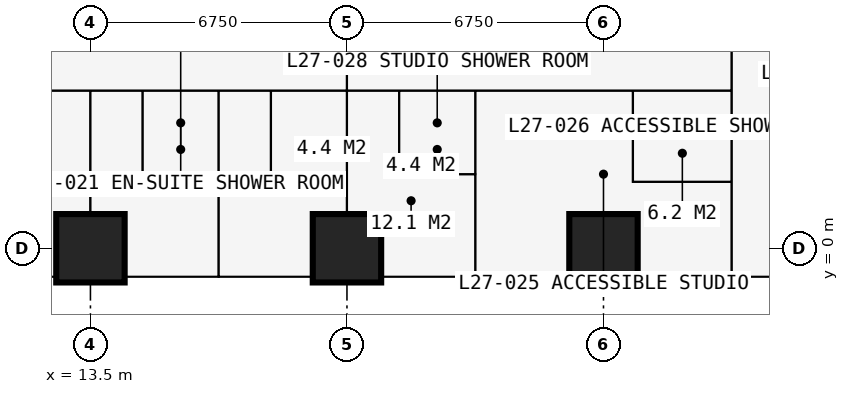
"""IFC4 building model, lengths in metres.
Left out: names, types, materials, properties, quantities, classifications, styles, units other than length and angle.
Written with IfcOpenShell. Run it as: python <this file> out.ifc"""

import sys

from ifc_helpers import new_model, si_unit, direction, frame, frame_2d, origin, origin_2d, place, context, subcontext, project, spatial, rectangle, extrude, element, fill, save


model = new_model("IFC4")
c1 = context("Model", 3, precision=1e-05, world=origin(), true_north=direction((0.0, 1.0)))
c2 = subcontext(c1, "Body", "Model", "MODEL_VIEW")
j1 = project(units=[si_unit("LENGTHUNIT", "METRE"), si_unit("PLANEANGLEUNIT", "RADIAN")], contexts=[c1])
p1 = place(None, origin())
s1 = spatial("IfcSite", under=j1, at=p1, CompositionType="ELEMENT")
p2 = place(p1, origin())
s2 = spatial("IfcBuilding", under=s1, at=p2, CompositionType="ELEMENT")
p3 = place(p2, frame((0.0, 0.0, 101.7)))
s3 = spatial("IfcBuildingStorey", under=s2, at=p3, CompositionType="ELEMENT", Elevation=101.7)
for number, where, z_axis, x_axis in (
    (1, (13.5, 0.0, 0.0), (0.0, 0.0, 1.0), (1.0, 0.0, 0.0)),
    (2, (20.25, 0.0, 0.0), (0.0, 0.0, 1.0), (1.0, 0.0, 0.0)),
    (3, (27.0, 0.0, 0.0), (0.0, 0.0, 1.0), (1.0, 0.0, 0.0)),
):
    element("IfcColumn", number, at=place(p3, frame(where, z_axis=z_axis, x_axis=x_axis)), inside=s3, PredefinedType="COLUMN", context=c2, shape_type="SweptSolid", body=[
        extrude(rectangle(XDim=1.8, YDim=1.8, at=origin_2d()), origin(), (0.0, 0.0, 1.0), 3.6),
    ])
p4 = place(p3, frame((20.25, -0.75, 0.0), z_axis=(0.0, 0.0, 1.0), x_axis=(-1.0, 0.0, 0.0)))
e4 = element("IfcWall", 4, at=p4, inside=s3, PredefinedType="SOLIDWALL", context=c2, shape_type="SweptSolid", body=[
    extrude(rectangle(XDim=6.75, YDim=0.15, at=frame_2d((3.375, 0.0))), origin(), (0.0, 0.0, 1.0), 3.375),
])
p5 = place(p4, frame((0.962, 0.0, 0.0)))
e5 = element("IfcOpeningElement", 5, at=p5, cuts=e4, PredefinedType="OPENING", context=c2, shape_type="SweptSolid", body=[
    extrude(rectangle(XDim=1.0, YDim=2.2, at=frame_2d((0.5, 1.1))), frame((0.0, 0.085, 0.0), z_axis=(0.0, -1.0, 0.0), x_axis=(1.0, 0.0, 0.0)), (0.0, 0.0, 1.0), 0.17),
])
p6 = place(p4, frame((2.025, 0.0, 0.9)))
e6 = element("IfcOpeningElement", 6, at=p6, cuts=e4, PredefinedType="OPENING", context=c2, shape_type="SweptSolid", body=[
    extrude(rectangle(XDim=1.2, YDim=1.8, at=frame_2d((0.6, 0.9))), frame((0.0, 0.085, 0.0), z_axis=(0.0, -1.0, 0.0), x_axis=(1.0, 0.0, 0.0)), (0.0, 0.0, 1.0), 0.17),
])
p7 = place(p4, frame((4.788, 0.0, 0.0)))
e7 = element("IfcOpeningElement", 7, at=p7, cuts=e4, PredefinedType="OPENING", context=c2, shape_type="SweptSolid", body=[
    extrude(rectangle(XDim=1.0, YDim=2.2, at=frame_2d((0.5, 1.1))), frame((0.0, 0.085, 0.0), z_axis=(0.0, -1.0, 0.0), x_axis=(1.0, 0.0, 0.0)), (0.0, 0.0, 1.0), 0.17),
])
p8 = place(p4, frame((3.525, 0.0, 0.9)))
e8 = element("IfcOpeningElement", 8, at=p8, cuts=e4, PredefinedType="OPENING", context=c2, shape_type="SweptSolid", body=[
    extrude(rectangle(XDim=1.2, YDim=1.8, at=frame_2d((0.6, 0.9))), frame((0.0, 0.085, 0.0), z_axis=(0.0, -1.0, 0.0), x_axis=(1.0, 0.0, 0.0)), (0.0, 0.0, 1.0), 0.17),
])
p9 = place(p3, frame((16.875, -0.85, 0.0), z_axis=(0.0, 0.0, 1.0), x_axis=(0.0, -1.0, 0.0)))
e9 = element("IfcWall", 9, at=p9, inside=s3, PredefinedType="USERDEFINED", context=c2, shape_type="SweptSolid", body=[
    extrude(rectangle(XDim=2.2, YDim=1.0, at=frame_2d((1.1, 0.0))), origin(), (0.0, 0.0, 1.0), 0.9),
])
p10 = place(p3, frame((6.75, 4.15, 0.0), z_axis=(0.0, 0.0, 1.0), x_axis=(1.0, 0.0, 0.0)))
e10 = element("IfcWall", 10, at=p10, inside=s3, PredefinedType="PARTITIONING", context=c2, shape_type="SweptSolid", body=[
    extrude(rectangle(XDim=23.625, YDim=0.1, at=frame_2d((11.812, 0.0))), origin(), (0.0, 0.0, 1.0), 3.375),
])
p11 = place(p10, frame((2.85, 0.0, 0.0)))
e11 = element("IfcOpeningElement", 11, at=p11, cuts=e10, PredefinedType="OPENING", context=c2, shape_type="SweptSolid", body=[
    extrude(rectangle(XDim=1.0, YDim=2.2, at=frame_2d((0.5, 1.1))), frame((0.0, 0.06, 0.0), z_axis=(0.0, -1.0, 0.0), x_axis=(1.0, 0.0, 0.0)), (0.0, 0.0, 1.0), 0.12),
])
p12 = place(p10, frame((6.95, 0.0, 0.0)))
e12 = element("IfcOpeningElement", 12, at=p12, cuts=e10, PredefinedType="OPENING", context=c2, shape_type="SweptSolid", body=[
    extrude(rectangle(XDim=0.95, YDim=2.2, at=frame_2d((0.475, 1.1))), frame((0.0, 0.06, 0.0), z_axis=(0.0, -1.0, 0.0), x_axis=(1.0, 0.0, 0.0)), (0.0, 0.0, 1.0), 0.12),
])
p13 = place(p10, frame((10.375, 0.0, 0.0)))
e13 = element("IfcOpeningElement", 13, at=p13, cuts=e10, PredefinedType="OPENING", context=c2, shape_type="SweptSolid", body=[
    extrude(rectangle(XDim=0.95, YDim=2.2, at=frame_2d((0.475, 1.1))), frame((0.0, 0.06, 0.0), z_axis=(0.0, -1.0, 0.0), x_axis=(1.0, 0.0, 0.0)), (0.0, 0.0, 1.0), 0.12),
])
p14 = place(p10, frame((18.475, 0.0, 0.0)))
e14 = element("IfcOpeningElement", 14, at=p14, cuts=e10, PredefinedType="OPENING", context=c2, shape_type="SweptSolid", body=[
    extrude(rectangle(XDim=0.95, YDim=2.2, at=frame_2d((0.475, 1.1))), frame((0.0, 0.06, 0.0), z_axis=(0.0, -1.0, 0.0), x_axis=(1.0, 0.0, 0.0)), (0.0, 0.0, 1.0), 0.12),
])
p15 = place(p10, frame((13.7, 0.0, 0.0)))
e15 = element("IfcOpeningElement", 15, at=p15, cuts=e10, PredefinedType="OPENING", context=c2, shape_type="SweptSolid", body=[
    extrude(rectangle(XDim=0.95, YDim=2.2, at=frame_2d((0.475, 1.1))), frame((0.0, 0.06, 0.0), z_axis=(0.0, -1.0, 0.0), x_axis=(1.0, 0.0, 0.0)), (0.0, 0.0, 1.0), 0.12),
])
p16 = place(p3, frame((13.5, -0.734, 0.0), z_axis=(0.0, 0.0, 1.0), x_axis=(0.0, 1.0, 0.0)))
e16 = element("IfcWall", 16, at=p16, inside=s3, PredefinedType="PARTITIONING", context=c2, shape_type="SweptSolid", body=[
    extrude(rectangle(XDim=4.884, YDim=0.15, at=frame_2d((2.442, 0.0))), origin(), (0.0, 0.0, 1.0), 2.877),
])
p17 = place(p3, frame((14.875, 1.95, 0.0), z_axis=(0.0, 0.0, 1.0), x_axis=(0.0, 1.0, 0.0)))
e17 = element("IfcWall", 17, at=p17, inside=s3, PredefinedType="PARTITIONING", context=c2, shape_type="SweptSolid", body=[
    extrude(rectangle(XDim=2.2, YDim=0.1, at=frame_2d((1.1, 0.0))), origin(), (0.0, 0.0, 1.0), 3.375),
])
p18 = place(p17, frame((0.65, 0.0, 0.0)))
e18 = element("IfcOpeningElement", 18, at=p18, cuts=e17, PredefinedType="OPENING", context=c2, shape_type="SweptSolid", body=[
    extrude(rectangle(XDim=0.9, YDim=2.2, at=frame_2d((0.45, 1.1))), frame((0.0, 0.06, 0.0), z_axis=(0.0, -1.0, 0.0), x_axis=(1.0, 0.0, 0.0)), (0.0, 0.0, 1.0), 0.12),
])
p19 = place(p3, frame((14.875, 1.95, 0.0), z_axis=(0.0, 0.0, 1.0), x_axis=(1.0, 0.0, 0.0)))
e19 = element("IfcWall", 19, at=p19, inside=s3, PredefinedType="PARTITIONING", context=c2, shape_type="SweptSolid", body=[
    extrude(rectangle(XDim=2.0, YDim=0.1, at=frame_2d((1.0, 0.0))), origin(), (0.0, 0.0, 1.0), 3.375),
])
p20 = place(p3, frame((16.875, -0.734, 0.0), z_axis=(0.0, 0.0, 1.0), x_axis=(0.0, 1.0, 0.0)))
e20 = element("IfcWall", 20, at=p20, inside=s3, PredefinedType="PARTITIONING", context=c2, shape_type="SweptSolid", body=[
    extrude(rectangle(XDim=4.884, YDim=0.175, at=frame_2d((2.442, 0.0))), origin(), (0.0, 0.0, 1.0), 3.375),
])
p21 = place(p3, frame((18.25, 1.95, 0.0), z_axis=(0.0, 0.0, 1.0), x_axis=(0.0, 1.0, 0.0)))
e21 = element("IfcWall", 21, at=p21, inside=s3, PredefinedType="PARTITIONING", context=c2, shape_type="SweptSolid", body=[
    extrude(rectangle(XDim=2.2, YDim=0.1, at=frame_2d((1.1, 0.0))), origin(), (0.0, 0.0, 1.0), 3.375),
])
p22 = place(p21, frame((0.65, 0.0, 0.0)))
e22 = element("IfcOpeningElement", 22, at=p22, cuts=e21, PredefinedType="OPENING", context=c2, shape_type="SweptSolid", body=[
    extrude(rectangle(XDim=0.9, YDim=2.2, at=frame_2d((0.45, 1.1))), frame((0.0, 0.06, 0.0), z_axis=(0.0, -1.0, 0.0), x_axis=(1.0, 0.0, 0.0)), (0.0, 0.0, 1.0), 0.12),
])
p23 = place(p3, frame((18.25, 1.95, 0.0), z_axis=(0.0, 0.0, 1.0), x_axis=(1.0, 0.0, 0.0)))
e23 = element("IfcWall", 23, at=p23, inside=s3, PredefinedType="PARTITIONING", context=c2, shape_type="SweptSolid", body=[
    extrude(rectangle(XDim=2.0, YDim=0.1, at=frame_2d((1.0, 0.0))), origin(), (0.0, 0.0, 1.0), 3.375),
])
p24 = place(p3, frame((20.25, -0.734, 0.0), z_axis=(0.0, 0.0, 1.0), x_axis=(0.0, 1.0, 0.0)))
e24 = element("IfcWall", 24, at=p24, inside=s3, PredefinedType="PARTITIONING", context=c2, shape_type="SweptSolid", body=[
    extrude(rectangle(XDim=12.034, YDim=0.15, at=frame_2d((6.017, 0.0))), origin(), (0.0, 0.0, 1.0), 2.61),
])
p25 = place(p3, frame((21.625, 1.95, 0.0), z_axis=(0.0, 0.0, 1.0), x_axis=(0.0, 1.0, 0.0)))
e25 = element("IfcWall", 25, at=p25, inside=s3, PredefinedType="PARTITIONING", context=c2, shape_type="SweptSolid", body=[
    extrude(rectangle(XDim=2.2, YDim=0.1, at=frame_2d((1.1, 0.0))), origin(), (0.0, 0.0, 1.0), 3.375),
])
p26 = place(p3, frame((21.625, 1.95, 0.0), z_axis=(0.0, 0.0, 1.0), x_axis=(1.0, 0.0, 0.0)))
e26 = element("IfcWall", 26, at=p26, inside=s3, PredefinedType="PARTITIONING", context=c2, shape_type="SweptSolid", body=[
    extrude(rectangle(XDim=2.0, YDim=0.1, at=frame_2d((1.0, 0.0))), origin(), (0.0, 0.0, 1.0), 3.375),
])
p27 = place(p3, frame((23.625, -0.734, 0.0), z_axis=(0.0, 0.0, 1.0), x_axis=(0.0, 1.0, 0.0)))
e27 = element("IfcWall", 27, at=p27, inside=s3, PredefinedType="PARTITIONING", context=c2, shape_type="SweptSolid", body=[
    extrude(rectangle(XDim=4.884, YDim=0.175, at=frame_2d((2.442, 0.0))), origin(), (0.0, 0.0, 1.0), 3.375),
])
p28 = place(p27, frame((3.334, 0.0, 0.0)))
e28 = element("IfcOpeningElement", 28, at=p28, cuts=e27, PredefinedType="OPENING", context=c2, shape_type="SweptSolid", body=[
    extrude(rectangle(XDim=0.9, YDim=2.2, at=frame_2d((0.45, 1.1))), frame((0.0, 0.097, 0.0), z_axis=(0.0, -1.0, 0.0), x_axis=(1.0, 0.0, 0.0)), (0.0, 0.0, 1.0), 0.195),
])
p29 = place(p3, frame((27.775, 1.75, 0.0), z_axis=(0.0, 0.0, 1.0), x_axis=(0.0, 1.0, 0.0)))
e29 = element("IfcWall", 29, at=p29, inside=s3, PredefinedType="PARTITIONING", context=c2, shape_type="SweptSolid", body=[
    extrude(rectangle(XDim=2.4, YDim=0.1, at=frame_2d((1.2, 0.0))), origin(), (0.0, 0.0, 1.0), 3.375),
])
p30 = place(p3, frame((27.775, 1.75, 0.0), z_axis=(0.0, 0.0, 1.0), x_axis=(1.0, 0.0, 0.0)))
e30 = element("IfcWall", 30, at=p30, inside=s3, PredefinedType="PARTITIONING", context=c2, shape_type="SweptSolid", body=[
    extrude(rectangle(XDim=2.6, YDim=0.1, at=frame_2d((1.3, 0.0))), origin(), (0.0, 0.0, 1.0), 3.375),
])
p31 = place(p30, frame((0.85, 0.0, 0.0)))
e31 = element("IfcOpeningElement", 31, at=p31, cuts=e30, PredefinedType="OPENING", context=c2, shape_type="SweptSolid", body=[
    extrude(rectangle(XDim=0.9, YDim=2.2, at=frame_2d((0.45, 1.1))), frame((0.0, 0.06, 0.0), z_axis=(0.0, -1.0, 0.0), x_axis=(1.0, 0.0, 0.0)), (0.0, 0.0, 1.0), 0.12),
])
p32 = place(p3, frame((30.375, -0.734, 0.0), z_axis=(0.0, 0.0, 1.0), x_axis=(0.0, 1.0, 0.0)))
e32 = element("IfcWall", 32, at=p32, inside=s3, PredefinedType="PARTITIONING", context=c2, shape_type="SweptSolid", body=[
    extrude(rectangle(XDim=12.034, YDim=0.15, at=frame_2d((6.017, 0.0))), origin(), (0.0, 0.0, 1.0), 3.375),
])
p33 = place(p32, frame((5.134, 0.0, 0.0)))
e33 = element("IfcOpeningElement", 33, at=p33, cuts=e32, PredefinedType="OPENING", context=c2, shape_type="SweptSolid", body=[
    extrude(rectangle(XDim=1.0, YDim=2.2, at=frame_2d((0.5, 1.1))), frame((0.0, 0.085, 0.0), z_axis=(0.0, -1.0, 0.0), x_axis=(1.0, 0.0, 0.0)), (0.0, 0.0, 1.0), 0.17),
])
p34 = place(p5, origin())
e34 = element("IfcDoor", 34, at=p34, inside=s3, OperationType="SINGLE_SWING_LEFT", PredefinedType="DOOR", context=c2, shape_type="SweptSolid", body=[
    extrude(rectangle(XDim=1.0, YDim=2.2, at=frame_2d((0.5, 1.1))), frame((0.0, 0.025, 0.0), z_axis=(0.0, -1.0, 0.0), x_axis=(1.0, 0.0, 0.0)), (0.0, 0.0, 1.0), 0.05),
])
fill(e5, e34)
p35 = place(p6, origin())
e35 = element("IfcWindow", 35, at=p35, inside=s3, PartitioningType="SINGLE_PANEL", PredefinedType="WINDOW", context=c2, shape_type="SweptSolid", body=[
    extrude(rectangle(XDim=1.2, YDim=1.8, at=frame_2d((0.6, 0.9))), frame((0.0, 0.03, 0.0), z_axis=(0.0, -1.0, 0.0), x_axis=(1.0, 0.0, 0.0)), (0.0, 0.0, 1.0), 0.06),
])
fill(e6, e35)
p36 = place(p7, origin())
e36 = element("IfcDoor", 36, at=p36, inside=s3, OperationType="SINGLE_SWING_RIGHT", PredefinedType="DOOR", context=c2, shape_type="SweptSolid", body=[
    extrude(rectangle(XDim=1.0, YDim=2.2, at=frame_2d((0.5, 1.1))), frame((0.0, 0.025, 0.0), z_axis=(0.0, -1.0, 0.0), x_axis=(1.0, 0.0, 0.0)), (0.0, 0.0, 1.0), 0.05),
])
fill(e7, e36)
p37 = place(p8, origin())
e37 = element("IfcWindow", 37, at=p37, inside=s3, PartitioningType="SINGLE_PANEL", PredefinedType="WINDOW", context=c2, shape_type="SweptSolid", body=[
    extrude(rectangle(XDim=1.2, YDim=1.8, at=frame_2d((0.6, 0.9))), frame((0.0, 0.03, 0.0), z_axis=(0.0, -1.0, 0.0), x_axis=(1.0, 0.0, 0.0)), (0.0, 0.0, 1.0), 0.06),
])
fill(e8, e37)
p38 = place(p12, origin())
e38 = element("IfcDoor", 38, at=p38, inside=s3, OperationType="SINGLE_SWING_LEFT", PredefinedType="DOOR", context=c2, shape_type="SweptSolid", body=[
    extrude(rectangle(XDim=0.95, YDim=2.2, at=frame_2d((0.475, 1.1))), frame((0.0, 0.025, 0.0), z_axis=(0.0, -1.0, 0.0), x_axis=(1.0, 0.0, 0.0)), (0.0, 0.0, 1.0), 0.05),
])
fill(e12, e38)
p39 = place(p18, origin())
e39 = element("IfcDoor", 39, at=p39, inside=s3, OperationType="SINGLE_SWING_RIGHT", PredefinedType="DOOR", context=c2, shape_type="SweptSolid", body=[
    extrude(rectangle(XDim=0.9, YDim=2.2, at=frame_2d((0.45, 1.1))), frame((0.0, 0.025, 0.0), z_axis=(0.0, -1.0, 0.0), x_axis=(1.0, 0.0, 0.0)), (0.0, 0.0, 1.0), 0.05),
])
fill(e18, e39)
p40 = place(p13, origin())
e40 = element("IfcDoor", 40, at=p40, inside=s3, OperationType="SINGLE_SWING_LEFT", PredefinedType="DOOR", context=c2, shape_type="SweptSolid", body=[
    extrude(rectangle(XDim=0.95, YDim=2.2, at=frame_2d((0.475, 1.1))), frame((0.0, 0.025, 0.0), z_axis=(0.0, -1.0, 0.0), x_axis=(1.0, 0.0, 0.0)), (0.0, 0.0, 1.0), 0.05),
])
fill(e13, e40)
p41 = place(p22, origin())
e41 = element("IfcDoor", 41, at=p41, inside=s3, OperationType="SINGLE_SWING_RIGHT", PredefinedType="DOOR", context=c2, shape_type="SweptSolid", body=[
    extrude(rectangle(XDim=0.9, YDim=2.2, at=frame_2d((0.45, 1.1))), frame((0.0, 0.025, 0.0), z_axis=(0.0, -1.0, 0.0), x_axis=(1.0, 0.0, 0.0)), (0.0, 0.0, 1.0), 0.05),
])
fill(e22, e41)
p42 = place(p14, origin())
e42 = element("IfcDoor", 42, at=p42, inside=s3, OperationType="SINGLE_SWING_LEFT", PredefinedType="DOOR", context=c2, shape_type="SweptSolid", body=[
    extrude(rectangle(XDim=0.95, YDim=2.2, at=frame_2d((0.475, 1.1))), frame((0.0, 0.025, 0.0), z_axis=(0.0, -1.0, 0.0), x_axis=(1.0, 0.0, 0.0)), (0.0, 0.0, 1.0), 0.05),
])
fill(e14, e42)
p43 = place(p31, origin())
e43 = element("IfcDoor", 43, at=p43, inside=s3, OperationType="SINGLE_SWING_RIGHT", PredefinedType="DOOR", context=c2, shape_type="SweptSolid", body=[
    extrude(rectangle(XDim=0.9, YDim=2.2, at=frame_2d((0.45, 1.1))), frame((0.0, 0.025, 0.0), z_axis=(0.0, -1.0, 0.0), x_axis=(1.0, 0.0, 0.0)), (0.0, 0.0, 1.0), 0.05),
])
fill(e31, e43)
p44 = place(p15, origin())
e44 = element("IfcDoor", 44, at=p44, inside=s3, OperationType="SINGLE_SWING_LEFT", PredefinedType="DOOR", context=c2, shape_type="SweptSolid", body=[
    extrude(rectangle(XDim=0.95, YDim=2.2, at=frame_2d((0.475, 1.1))), frame((0.0, 0.025, 0.0), z_axis=(0.0, -1.0, 0.0), x_axis=(1.0, 0.0, 0.0)), (0.0, 0.0, 1.0), 0.05),
])
fill(e15, e44)
p45 = place(p28, origin())
e45 = element("IfcDoor", 45, at=p45, inside=s3, OperationType="SINGLE_SWING_RIGHT", PredefinedType="DOOR", context=c2, shape_type="SweptSolid", body=[
    extrude(rectangle(XDim=0.9, YDim=2.2, at=frame_2d((0.45, 1.1))), frame((0.0, 0.025, 0.0), z_axis=(0.0, -1.0, 0.0), x_axis=(1.0, 0.0, 0.0)), (0.0, 0.0, 1.0), 0.05),
])
fill(e28, e45)
p46 = place(p33, origin())
e46 = element("IfcDoor", 46, at=p46, inside=s3, OperationType="SINGLE_SWING_LEFT", PredefinedType="DOOR", context=c2, shape_type="SweptSolid", body=[
    extrude(rectangle(XDim=1.0, YDim=2.2, at=frame_2d((0.5, 1.1))), frame((0.0, 0.025, 0.0), z_axis=(0.0, -1.0, 0.0), x_axis=(1.0, 0.0, 0.0)), (0.0, 0.0, 1.0), 0.05),
])
fill(e33, e46)
save(model, sys.argv[1])
